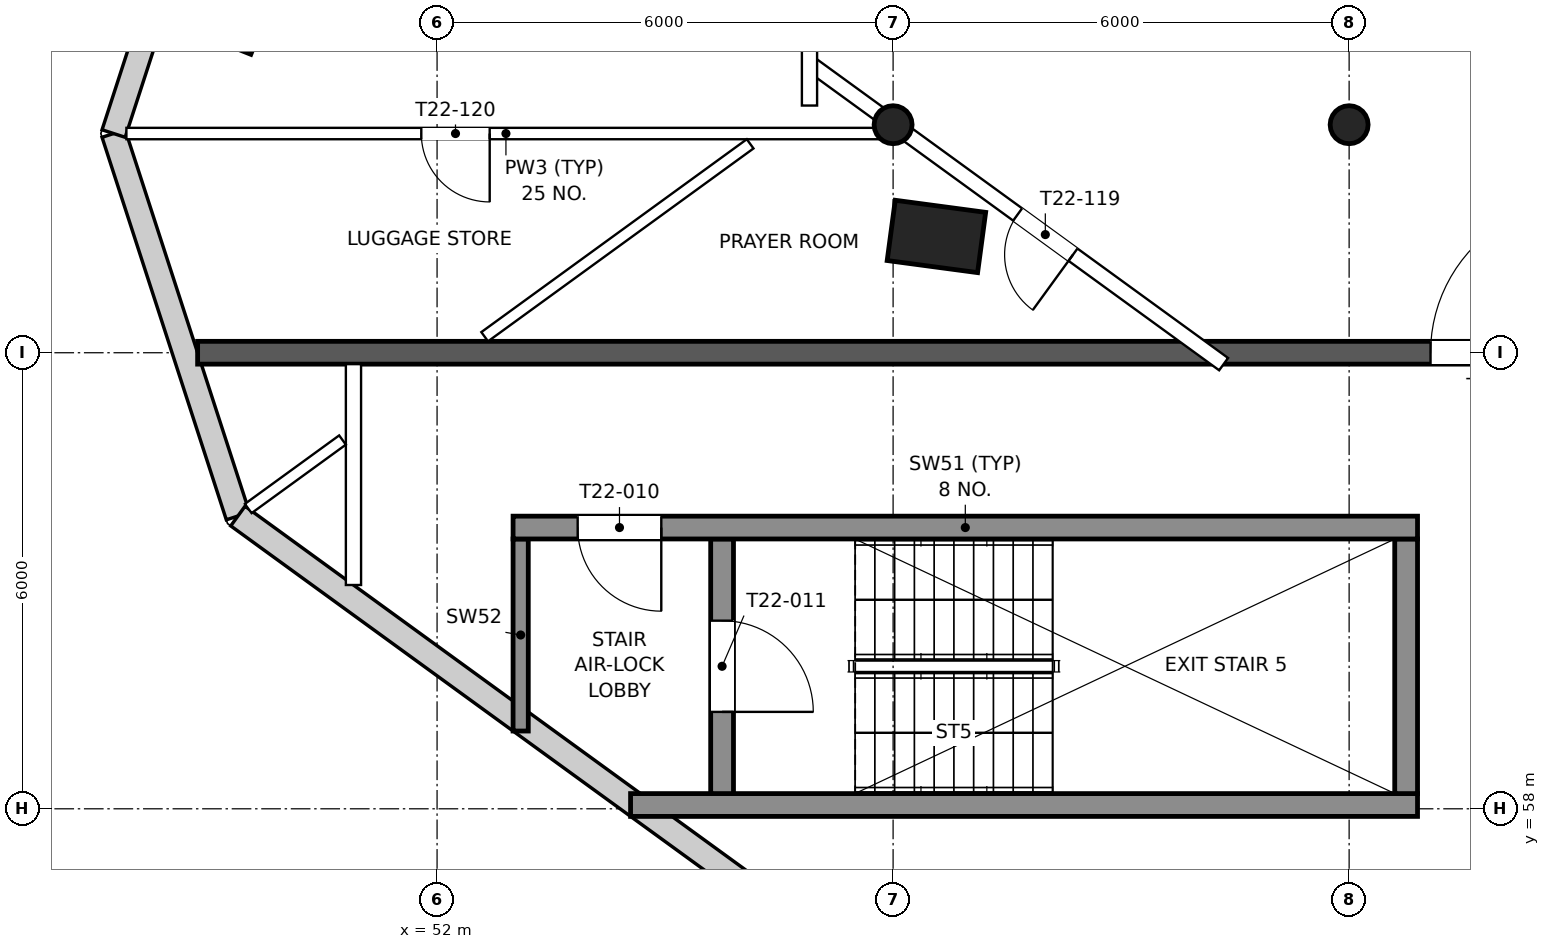
"""IFC4 building model, lengths in metres.
Left out: names, types, materials, properties, quantities, classifications, styles, units other than length and angle.
Written with IfcOpenShell. Run it as: python <this file> out.ifc"""

import sys

from ifc_helpers import new_model, si_unit, direction, frame, frame_2d, origin, origin_2d, place, context, subcontext, project, spatial, rectangle, circle, extrude, element, fill, save


model = new_model("IFC4")
c1 = context("Model", 3, precision=1e-05, world=origin(), true_north=direction((0.0, 1.0)))
c2 = subcontext(c1, "Body", "Model", "MODEL_VIEW")
j1 = project(units=[si_unit("LENGTHUNIT", "METRE"), si_unit("PLANEANGLEUNIT", "RADIAN")], contexts=[c1])
p1 = place(None, origin())
s1 = spatial("IfcSite", under=j1, at=p1, CompositionType="ELEMENT")
p2 = place(p1, origin())
s2 = spatial("IfcBuilding", under=s1, at=p2, CompositionType="ELEMENT")
p3 = place(p2, frame((0.0, 0.0, 313.9)))
s3 = spatial("IfcBuildingStorey", under=s2, at=p3, CompositionType="ELEMENT", Elevation=313.9)
for number, where, z_axis, x_axis in (
    (1, (49.14, 68.52, 0.0), (0.0, 0.0, 1.0), (0.37, 0.929, 0.0)),
    (2, (58.57, 65.53, 0.0), (0.0, 0.0, 1.0), (0.133, 0.991, 0.0)),
):
    element("IfcColumn", number, at=place(p3, frame(where, z_axis=z_axis, x_axis=x_axis)), inside=s3, PredefinedType="COLUMN", context=c2, shape_type="SweptSolid", body=[
        extrude(rectangle(XDim=0.8, YDim=1.2, at=origin_2d()), origin(), (0.0, 0.0, 1.0), 3.9),
    ])
for number, where, z_axis, x_axis in (
    (3, (58.0, 67.0, 0.0), (0.0, 0.0, 1.0), (1.0, 0.0, 0.0)),
    (4, (64.0, 67.0, 0.0), (0.0, 0.0, 1.0), (1.0, 0.0, 0.0)),
):
    element("IfcColumn", number, at=place(p3, frame(where, z_axis=z_axis, x_axis=x_axis)), inside=s3, PredefinedType="COLUMN", context=c2, shape_type="SweptSolid", body=[
        extrude(circle(Radius=0.25, at=origin_2d()), origin(), (0.0, 0.0, 1.0), 3.9),
    ])
p4 = place(p3, frame((47.744, 66.884, 0.0), z_axis=(0.0, 0.0, 1.0), x_axis=(0.30904851291, -0.951046274725, 0.0)))
e5 = element("IfcWall", 5, at=p4, inside=s3, PredefinedType="SOLIDWALL", context=c2, shape_type="SweptSolid", body=[
    extrude(rectangle(XDim=5.291, YDim=0.32, at=frame_2d((2.646, 0.0))), origin(), (0.0, 0.0, 1.0), 3.6),
])
p5 = place(p3, frame((49.379, 61.852, 0.0), z_axis=(0.0, 0.0, 1.0), x_axis=(0.809014717996, -0.587788385447, 0.0)))
e6 = element("IfcWall", 6, at=p5, inside=s3, PredefinedType="SOLIDWALL", context=c2, shape_type="SweptSolid", body=[
    extrude(rectangle(XDim=21.136, YDim=0.32, at=frame_2d((10.568, 0.0))), origin(), (0.0, 0.0, 1.0), 3.6),
])
p6 = place(p5, frame((13.868, 0.0, 0.55)))
e7 = element("IfcOpeningElement", 7, at=p6, cuts=e6, PredefinedType="OPENING", context=c2, shape_type="SweptSolid", body=[
    extrude(rectangle(XDim=2.4, YDim=2.3, at=frame_2d((1.2, 1.15))), frame((0.0, 0.17, 0.0), z_axis=(0.0, -1.0, 0.0), x_axis=(1.0, 0.0, 0.0)), (0.0, 0.0, 1.0), 0.34),
])
p7 = place(p5, frame((16.868, 0.0, 0.55)))
e8 = element("IfcOpeningElement", 8, at=p7, cuts=e6, PredefinedType="OPENING", context=c2, shape_type="SweptSolid", body=[
    extrude(rectangle(XDim=2.4, YDim=2.3, at=frame_2d((1.2, 1.15))), frame((0.0, 0.17, 0.0), z_axis=(0.0, -1.0, 0.0), x_axis=(1.0, 0.0, 0.0)), (0.0, 0.0, 1.0), 0.34),
])
p8 = place(p3, frame((53.298, 83.977, 0.0), z_axis=(0.0, 0.0, 1.0), x_axis=(-0.309017883781, -0.951056227309, 0.0)))
e9 = element("IfcWall", 9, at=p8, inside=s3, PredefinedType="SOLIDWALL", context=c2, shape_type="SweptSolid", body=[
    extrude(rectangle(XDim=17.973, YDim=0.32, at=frame_2d((8.986, 0.0))), origin(), (0.0, 0.0, 1.0), 3.6),
])
p9 = place(p8, frame((1.787, 0.0, 0.55)))
e10 = element("IfcOpeningElement", 10, at=p9, cuts=e9, PredefinedType="OPENING", context=c2, shape_type="SweptSolid", body=[
    extrude(rectangle(XDim=2.4, YDim=2.3, at=frame_2d((1.2, 1.15))), frame((0.0, 0.17, 0.0), z_axis=(0.0, -1.0, 0.0), x_axis=(1.0, 0.0, 0.0)), (0.0, 0.0, 1.0), 0.34),
])
p10 = place(p8, frame((4.787, 0.0, 0.55)))
e11 = element("IfcOpeningElement", 11, at=p10, cuts=e9, PredefinedType="OPENING", context=c2, shape_type="SweptSolid", body=[
    extrude(rectangle(XDim=2.4, YDim=2.3, at=frame_2d((1.2, 1.15))), frame((0.0, 0.17, 0.0), z_axis=(0.0, -1.0, 0.0), x_axis=(1.0, 0.0, 0.0)), (0.0, 0.0, 1.0), 0.34),
])
p11 = place(p8, frame((7.787, 0.0, 0.55)))
e12 = element("IfcOpeningElement", 12, at=p11, cuts=e9, PredefinedType="OPENING", context=c2, shape_type="SweptSolid", body=[
    extrude(rectangle(XDim=2.4, YDim=2.3, at=frame_2d((1.2, 1.15))), frame((0.0, 0.17, 0.0), z_axis=(0.0, -1.0, 0.0), x_axis=(1.0, 0.0, 0.0)), (0.0, 0.0, 1.0), 0.34),
])
p12 = place(p8, frame((10.787, 0.0, 0.55)))
e13 = element("IfcOpeningElement", 13, at=p12, cuts=e9, PredefinedType="OPENING", context=c2, shape_type="SweptSolid", body=[
    extrude(rectangle(XDim=2.4, YDim=2.3, at=frame_2d((1.2, 1.15))), frame((0.0, 0.17, 0.0), z_axis=(0.0, -1.0, 0.0), x_axis=(1.0, 0.0, 0.0)), (0.0, 0.0, 1.0), 0.34),
])
p13 = place(p8, frame((13.886, 0.0, 0.75)))
e14 = element("IfcOpeningElement", 14, at=p13, cuts=e9, PredefinedType="OPENING", context=c2, shape_type="SweptSolid", body=[
    extrude(rectangle(XDim=2.2, YDim=2.1, at=frame_2d((1.1, 1.05))), frame((0.0, 0.17, 0.0), z_axis=(0.0, -1.0, 0.0), x_axis=(1.0, 0.0, 0.0)), (0.0, 0.0, 1.0), 0.34),
])
p14 = place(p3, frame((54.546, 58.05, 0.0), z_axis=(0.0, 0.0, 1.0), x_axis=(1.0, 0.0, 0.0)))
e15 = element("IfcWall", 15, at=p14, inside=s3, PredefinedType="SHEAR", context=c2, shape_type="SweptSolid", body=[
    extrude(rectangle(XDim=10.354, YDim=0.3, at=frame_2d((5.177, 0.0))), origin(), (0.0, 0.0, 1.0), 3.9),
])
p15 = place(p3, frame((55.75, 58.2, 0.0), z_axis=(0.0, 0.0, 1.0), x_axis=(0.0, 1.0, 0.0)))
e16 = element("IfcWall", 16, at=p15, inside=s3, PredefinedType="SHEAR", context=c2, shape_type="SweptSolid", body=[
    extrude(rectangle(XDim=3.35, YDim=0.3, at=frame_2d((1.675, 0.0))), origin(), (0.0, 0.0, 1.0), 3.9),
])
p16 = place(p15, frame((1.075, 0.0, 0.0)))
e17 = element("IfcOpeningElement", 17, at=p16, cuts=e16, PredefinedType="OPENING", context=c2, shape_type="SweptSolid", body=[
    extrude(rectangle(XDim=1.2, YDim=2.1, at=frame_2d((0.6, 1.05))), frame((0.0, 0.16, 0.0), z_axis=(0.0, -1.0, 0.0), x_axis=(1.0, 0.0, 0.0)), (0.0, 0.0, 1.0), 0.32),
])
p17 = place(p3, frame((64.75, 58.2, 0.0), z_axis=(0.0, 0.0, 1.0), x_axis=(0.0, 1.0, 0.0)))
e18 = element("IfcWall", 18, at=p17, inside=s3, PredefinedType="SHEAR", context=c2, shape_type="SweptSolid", body=[
    extrude(rectangle(XDim=3.35, YDim=0.3, at=frame_2d((1.675, 0.0))), origin(), (0.0, 0.0, 1.0), 3.9),
])
p18 = place(p3, frame((53.1, 59.023, 0.0), z_axis=(0.0, 0.0, 1.0), x_axis=(0.0, 1.0, 0.0)))
e19 = element("IfcWall", 19, at=p18, inside=s3, PredefinedType="SHEAR", context=c2, shape_type="SweptSolid", body=[
    extrude(rectangle(XDim=2.527, YDim=0.2, at=frame_2d((1.263, 0.0))), origin(), (0.0, 0.0, 1.0), 3.9),
])
p19 = place(p3, frame((53.0, 61.7, 0.0), z_axis=(0.0, 0.0, 1.0), x_axis=(1.0, 0.0, 0.0)))
e20 = element("IfcWall", 20, at=p19, inside=s3, PredefinedType="SHEAR", context=c2, shape_type="SweptSolid", body=[
    extrude(rectangle(XDim=11.9, YDim=0.3, at=frame_2d((5.95, 0.0))), origin(), (0.0, 0.0, 1.0), 3.9),
])
p20 = place(p19, frame((0.85, 0.0, 0.0)))
e21 = element("IfcOpeningElement", 21, at=p20, cuts=e20, PredefinedType="OPENING", context=c2, shape_type="SweptSolid", body=[
    extrude(rectangle(XDim=1.1, YDim=2.1, at=frame_2d((0.55, 1.05))), frame((0.0, 0.16, 0.0), z_axis=(0.0, -1.0, 0.0), x_axis=(1.0, 0.0, 0.0)), (0.0, 0.0, 1.0), 0.32),
])
p21 = place(p3, frame((48.85, 64.0, 0.0), z_axis=(0.0, 0.0, 1.0), x_axis=(1.0, 0.0, 0.0)))
e22 = element("IfcWall", 22, at=p21, inside=s3, PredefinedType="PARTITIONING", context=c2, shape_type="SweptSolid", body=[
    extrude(rectangle(XDim=42.301, YDim=0.3, at=frame_2d((21.15, 0.0))), origin(), (0.0, 0.0, 1.0), 3.1),
])
p22 = place(p21, frame((16.222, 0.0, 0.0)))
e23 = element("IfcOpeningElement", 23, at=p22, cuts=e22, PredefinedType="OPENING", context=c2, shape_type="SweptSolid", body=[
    extrude(rectangle(XDim=2.0, YDim=2.1, at=frame_2d((1.0, 1.05))), frame((0.0, 0.16, 0.0), z_axis=(0.0, -1.0, 0.0), x_axis=(1.0, 0.0, 0.0)), (0.0, 0.0, 1.0), 0.32),
])
p23 = place(p21, frame((24.079, 0.0, 0.0)))
e24 = element("IfcOpeningElement", 24, at=p23, cuts=e22, PredefinedType="OPENING", context=c2, shape_type="SweptSolid", body=[
    extrude(rectangle(XDim=2.0, YDim=2.1, at=frame_2d((1.0, 1.05))), frame((0.0, 0.16, 0.0), z_axis=(0.0, -1.0, 0.0), x_axis=(1.0, 0.0, 0.0)), (0.0, 0.0, 1.0), 0.32),
])
p24 = place(p3, frame((50.9, 60.944, 0.0), z_axis=(0.0, 0.0, 1.0), x_axis=(0.0, 1.0, 0.0)))
e25 = element("IfcWall", 25, at=p24, inside=s3, PredefinedType="PARTITIONING", context=c2, shape_type="SweptSolid", body=[
    extrude(rectangle(XDim=2.906, YDim=0.2, at=frame_2d((1.453, 0.0))), origin(), (0.0, 0.0, 1.0), 3.6),
])
p25 = place(p3, frame((62.349, 63.85, 0.0), z_axis=(0.0, 0.0, 1.0), x_axis=(-0.809033820778, 0.587762092038, 0.0)))
e26 = element("IfcWall", 26, at=p25, inside=s3, PredefinedType="PARTITIONING", context=c2, shape_type="SweptSolid", body=[
    extrude(rectangle(XDim=6.735, YDim=0.2, at=frame_2d((3.367, 0.0))), origin(), (0.0, 0.0, 1.0), 3.6),
])
p26 = place(p25, frame((2.45, 0.0, 0.0)))
e27 = element("IfcOpeningElement", 27, at=p26, cuts=e26, PredefinedType="OPENING", context=c2, shape_type="SweptSolid", body=[
    extrude(rectangle(XDim=0.9, YDim=2.1, at=frame_2d((0.45, 1.05))), frame((0.0, 0.11, 0.0), z_axis=(0.0, -1.0, 0.0), x_axis=(1.0, 0.0, 0.0)), (0.0, 0.0, 1.0), 0.22),
])
p27 = place(p3, frame((56.9, 67.252, 0.0), z_axis=(0.0, 0.0, 1.0), x_axis=(0.0, 1.0, 0.0)))
e28 = element("IfcWall", 28, at=p27, inside=s3, PredefinedType="PARTITIONING", context=c2, shape_type="SweptSolid", body=[
    extrude(rectangle(XDim=19.144, YDim=0.2, at=frame_2d((9.572, 0.0))), origin(), (0.0, 0.0, 1.0), 3.15),
])
p28 = place(p27, frame((3.656, 0.0, 0.0)))
e29 = element("IfcOpeningElement", 29, at=p28, cuts=e28, PredefinedType="OPENING", context=c2, shape_type="SweptSolid", body=[
    extrude(rectangle(XDim=0.9, YDim=2.1, at=frame_2d((0.45, 1.05))), frame((0.0, 0.11, 0.0), z_axis=(0.0, -1.0, 0.0), x_axis=(1.0, 0.0, 0.0)), (0.0, 0.0, 1.0), 0.22),
])
p29 = place(p27, frame((12.722, 0.0, 0.0)))
e30 = element("IfcOpeningElement", 30, at=p29, cuts=e28, PredefinedType="OPENING", context=c2, shape_type="SweptSolid", body=[
    extrude(rectangle(XDim=0.9, YDim=2.1, at=frame_2d((0.45, 1.05))), frame((0.0, 0.11, 0.0), z_axis=(0.0, -1.0, 0.0), x_axis=(1.0, 0.0, 0.0)), (0.0, 0.0, 1.0), 0.22),
])
p30 = place(p27, frame((15.823, 0.0, 0.0)))
e31 = element("IfcOpeningElement", 31, at=p30, cuts=e28, PredefinedType="OPENING", context=c2, shape_type="SweptSolid", body=[
    extrude(rectangle(XDim=0.9, YDim=2.1, at=frame_2d((0.45, 1.05))), frame((0.0, 0.11, 0.0), z_axis=(0.0, -1.0, 0.0), x_axis=(1.0, 0.0, 0.0)), (0.0, 0.0, 1.0), 0.22),
])
p31 = place(p3, frame((47.913, 66.884, 0.0), z_axis=(0.0, 0.0, 1.0), x_axis=(1.0, 0.0, 0.0)))
e32 = element("IfcWall", 32, at=p31, inside=s3, PredefinedType="PARTITIONING", context=c2, shape_type="SweptSolid", body=[
    extrude(rectangle(XDim=9.987, YDim=0.15, at=frame_2d((4.994, 0.0))), origin(), (0.0, 0.0, 1.0), 3.15),
])
p32 = place(p31, frame((3.88, 0.0, 0.0)))
e33 = element("IfcOpeningElement", 33, at=p32, cuts=e32, PredefinedType="OPENING", context=c2, shape_type="SweptSolid", body=[
    extrude(rectangle(XDim=0.9, YDim=2.1, at=frame_2d((0.45, 1.05))), frame((0.0, 0.085, 0.0), z_axis=(0.0, -1.0, 0.0), x_axis=(1.0, 0.0, 0.0)), (0.0, 0.0, 1.0), 0.17),
])
p33 = place(p3, frame((49.515, 61.95, 0.0), z_axis=(0.0, 0.0, 1.0), x_axis=(0.809059590881, 0.587726618764, 0.0)))
e34 = element("IfcWall", 34, at=p33, inside=s3, PredefinedType="PARTITIONING", context=c2, shape_type="SweptSolid", body=[
    extrude(rectangle(XDim=1.533, YDim=0.15, at=frame_2d((0.767, 0.0))), origin(), (0.0, 0.0, 1.0), 3.6),
])
p34 = place(p3, frame((52.626, 64.211, 0.0), z_axis=(0.0, 0.0, 1.0), x_axis=(0.809014773285, 0.587788309348, 0.0)))
e35 = element("IfcWall", 35, at=p34, inside=s3, PredefinedType="PARTITIONING", context=c2, shape_type="SweptSolid", body=[
    extrude(rectangle(XDim=4.317, YDim=0.15, at=frame_2d((2.159, 0.0))), origin(), (0.0, 0.0, 1.0), 3.6),
])
p35 = place(p20, frame((1.1, 0.0, 0.0), z_axis=(0.0, 0.0, 1.0), x_axis=(-1.0, 0.0, 0.0)))
e36 = element("IfcDoor", 36, at=p35, inside=s3, OperationType="SINGLE_SWING_LEFT", PredefinedType="DOOR", context=c2, shape_type="SweptSolid", body=[
    extrude(rectangle(XDim=1.1, YDim=2.1, at=frame_2d((0.55, 1.05))), frame((0.0, 0.025, 0.0), z_axis=(0.0, -1.0, 0.0), x_axis=(1.0, 0.0, 0.0)), (0.0, 0.0, 1.0), 0.05),
])
fill(e21, e36)
p36 = place(p16, frame((1.2, 0.0, 0.0), z_axis=(0.0, 0.0, 1.0), x_axis=(-1.0, 0.0, 0.0)))
e37 = element("IfcDoor", 37, at=p36, inside=s3, OperationType="SINGLE_SWING_RIGHT", PredefinedType="DOOR", context=c2, shape_type="SweptSolid", body=[
    extrude(rectangle(XDim=1.2, YDim=2.1, at=frame_2d((0.6, 1.05))), frame((0.0, 0.025, 0.0), z_axis=(0.0, -1.0, 0.0), x_axis=(1.0, 0.0, 0.0)), (0.0, 0.0, 1.0), 0.05),
])
fill(e17, e37)
p37 = place(p22, origin())
e38 = element("IfcDoor", 38, at=p37, inside=s3, OperationType="DOUBLE_DOOR_SINGLE_SWING", PredefinedType="DOOR", context=c2, shape_type="SweptSolid", body=[
    extrude(rectangle(XDim=2.0, YDim=2.1, at=frame_2d((1.0, 1.05))), frame((0.0, 0.025, 0.0), z_axis=(0.0, -1.0, 0.0), x_axis=(1.0, 0.0, 0.0)), (0.0, 0.0, 1.0), 0.05),
])
fill(e23, e38)
p38 = place(p26, origin())
e39 = element("IfcDoor", 39, at=p38, inside=s3, OperationType="SINGLE_SWING_LEFT", PredefinedType="DOOR", context=c2, shape_type="SweptSolid", body=[
    extrude(rectangle(XDim=0.9, YDim=2.1, at=frame_2d((0.45, 1.05))), frame((0.0, 0.025, 0.0), z_axis=(0.0, -1.0, 0.0), x_axis=(1.0, 0.0, 0.0)), (0.0, 0.0, 1.0), 0.05),
])
fill(e27, e39)
p39 = place(p32, frame((0.9, 0.0, 0.0), z_axis=(0.0, 0.0, 1.0), x_axis=(-1.0, 0.0, 0.0)))
e40 = element("IfcDoor", 40, at=p39, inside=s3, OperationType="SINGLE_SWING_LEFT", PredefinedType="DOOR", context=c2, shape_type="SweptSolid", body=[
    extrude(rectangle(XDim=0.9, YDim=2.1, at=frame_2d((0.45, 1.05))), frame((0.0, 0.025, 0.0), z_axis=(0.0, -1.0, 0.0), x_axis=(1.0, 0.0, 0.0)), (0.0, 0.0, 1.0), 0.05),
])
fill(e33, e40)
save(model, sys.argv[1])
